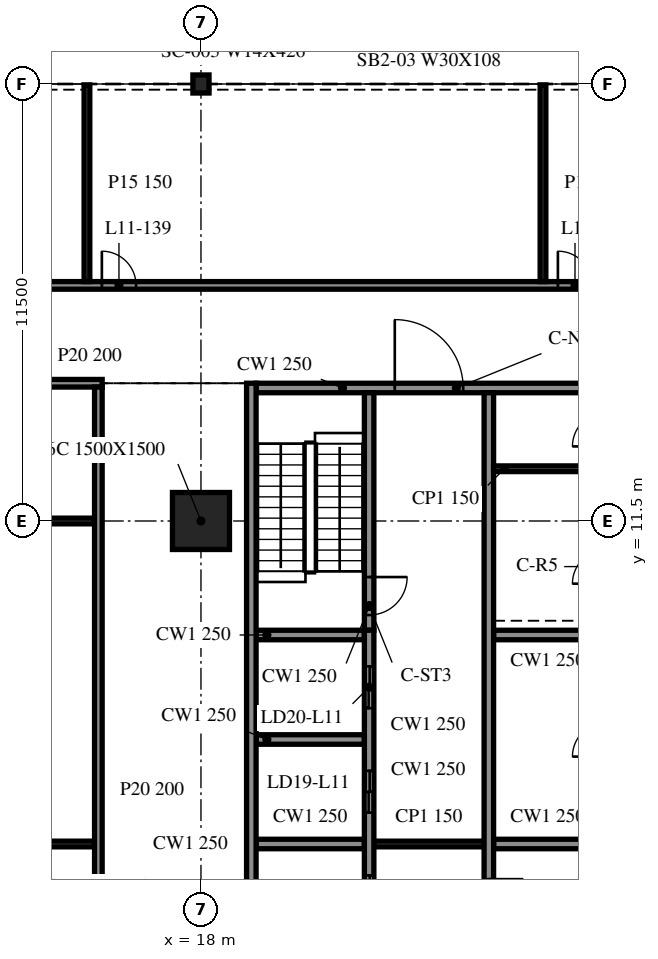
"""IFC4 building model, lengths in metres.
Left out: names, types, materials, properties, quantities, classifications, styles, units other than length and angle.
Written with IfcOpenShell. Run it as: python <this file> out.ifc"""

import sys

from ifc_helpers import new_model, si_unit, direction, frame, frame_2d, origin, origin_2d, place, context, subcontext, project, spatial, rectangle, i_section, extrude, element, fill, save


model = new_model("IFC4")
c1 = context("Model", 3, precision=1e-05, world=origin(), true_north=direction((0.0, 1.0)))
c2 = subcontext(c1, "Body", "Model", "MODEL_VIEW")
j1 = project(units=[si_unit("LENGTHUNIT", "METRE"), si_unit("PLANEANGLEUNIT", "RADIAN")], contexts=[c1])
p1 = place(None, origin())
s1 = spatial("IfcSite", under=j1, at=p1, CompositionType="ELEMENT")
p2 = place(p1, origin())
s2 = spatial("IfcBuilding", under=s1, at=p2, CompositionType="ELEMENT")
p3 = place(p2, frame((0.0, 0.0, 50.3)))
s3 = spatial("IfcBuildingStorey", under=s2, at=p3, CompositionType="ELEMENT", Elevation=50.3)
p4 = place(p3, frame((18.0, 11.5, -0.34), z_axis=(0.0, 0.0, 1.0), x_axis=(1.0, 0.0, 0.0)))
e1 = element("IfcColumn", 1, at=p4, inside=s3, PredefinedType="COLUMN", context=c2, shape_type="SweptSolid", body=[
    extrude(rectangle(XDim=1.5, YDim=1.5, at=origin_2d()), origin(), (0.0, 0.0, 1.0), 4.3),
])
p5 = place(p3, frame((18.0, 23.0, -0.34), z_axis=(0.0, 0.0, 1.0), x_axis=(1.0, 0.0, 0.0)))
e2 = element("IfcColumn", 2, at=p5, inside=s3, PredefinedType="COLUMN", context=c2, shape_type="SweptSolid", body=[
    extrude(i_section(OverallWidth=0.424, OverallDepth=0.475, WebThickness=0.048, FlangeThickness=0.077, at=origin_2d()), origin(), (0.0, 0.0, 1.0), 4.3),
])
p6 = place(p3, frame((19.325, 15.125, 0.0), z_axis=(0.0, 0.0, 1.0), x_axis=(0.0, -1.0, 0.0)))
e3 = element("IfcWall", 3, at=p6, inside=s3, PredefinedType="SOLIDWALL", context=c2, shape_type="SweptSolid", body=[
    extrude(rectangle(XDim=24.25, YDim=0.25, at=frame_2d((12.125, 0.0))), origin(), (0.0, 0.0, 1.0), 3.96),
])
p7 = place(p3, frame((19.45, 15.0, 0.0), z_axis=(0.0, 0.0, 1.0), x_axis=(1.0, 0.0, 0.0)))
e4 = element("IfcWall", 4, at=p7, inside=s3, PredefinedType="SOLIDWALL", context=c2, shape_type="SweptSolid", body=[
    extrude(rectangle(XDim=9.1, YDim=0.25, at=frame_2d((4.55, 0.0))), origin(), (0.0, 0.0, 1.0), 3.96),
])
p8 = place(p7, frame((3.65, 0.0, 0.0)))
e5 = element("IfcOpeningElement", 5, at=p8, cuts=e4, PredefinedType="OPENING", context=c2, shape_type="SweptSolid", body=[
    extrude(rectangle(XDim=1.8, YDim=2.1, at=frame_2d((0.9, 1.05))), frame((0.0, 0.135, 0.0), z_axis=(0.0, -1.0, 0.0), x_axis=(1.0, 0.0, 0.0)), (0.0, 0.0, 1.0), 0.27),
])
p9 = place(p3, frame((22.425, -8.875, 0.0), z_axis=(0.0, 0.0, 1.0), x_axis=(0.0, 1.0, 0.0)))
e6 = element("IfcWall", 6, at=p9, inside=s3, PredefinedType="SOLIDWALL", context=c2, shape_type="SweptSolid", body=[
    extrude(rectangle(XDim=17.5, YDim=0.25, at=frame_2d((8.75, 0.0))), origin(), (0.0, 0.0, 1.0), 3.96),
])
p10 = place(p9, frame((7.2, 0.0, 0.0)))
e7 = element("IfcOpeningElement", 7, at=p10, cuts=e6, PredefinedType="OPENING", context=c2, shape_type="SweptSolid", body=[
    extrude(rectangle(XDim=1.1, YDim=2.1, at=frame_2d((0.55, 1.05))), frame((0.0, 0.135, 0.0), z_axis=(0.0, -1.0, 0.0), x_axis=(1.0, 0.0, 0.0)), (0.0, 0.0, 1.0), 0.27),
])
p11 = place(p9, frame((9.95, 0.0, 0.0)))
e8 = element("IfcOpeningElement", 8, at=p11, cuts=e6, PredefinedType="OPENING", context=c2, shape_type="SweptSolid", body=[
    extrude(rectangle(XDim=1.1, YDim=2.1, at=frame_2d((0.55, 1.05))), frame((0.0, 0.135, 0.0), z_axis=(0.0, -1.0, 0.0), x_axis=(1.0, 0.0, 0.0)), (0.0, 0.0, 1.0), 0.27),
])
p12 = place(p9, frame((12.7, 0.0, 0.0)))
e9 = element("IfcOpeningElement", 9, at=p12, cuts=e6, PredefinedType="OPENING", context=c2, shape_type="SweptSolid", body=[
    extrude(rectangle(XDim=1.1, YDim=2.1, at=frame_2d((0.55, 1.05))), frame((0.0, 0.135, 0.0), z_axis=(0.0, -1.0, 0.0), x_axis=(1.0, 0.0, 0.0)), (0.0, 0.0, 1.0), 0.27),
])
p13 = place(p9, frame((15.45, 0.0, 0.0)))
e10 = element("IfcOpeningElement", 10, at=p13, cuts=e6, PredefinedType="OPENING", context=c2, shape_type="SweptSolid", body=[
    extrude(rectangle(XDim=1.1, YDim=2.1, at=frame_2d((0.55, 1.05))), frame((0.0, 0.135, 0.0), z_axis=(0.0, -1.0, 0.0), x_axis=(1.0, 0.0, 0.0)), (0.0, 0.0, 1.0), 0.27),
])
p14 = place(p9, frame((0.712, 0.0, 0.0)))
e11 = element("IfcOpeningElement", 11, at=p14, cuts=e6, PredefinedType="OPENING", context=c2, shape_type="SweptSolid", body=[
    extrude(rectangle(XDim=0.9, YDim=2.1, at=frame_2d((0.45, 1.05))), frame((0.0, 0.135, 0.0), z_axis=(0.0, -1.0, 0.0), x_axis=(1.0, 0.0, 0.0)), (0.0, 0.0, 1.0), 0.27),
])
p15 = place(p9, frame((3.788, 0.0, 0.0)))
e12 = element("IfcOpeningElement", 12, at=p15, cuts=e6, PredefinedType="OPENING", context=c2, shape_type="SweptSolid", body=[
    extrude(rectangle(XDim=0.9, YDim=2.1, at=frame_2d((0.45, 1.05))), frame((0.0, 0.135, 0.0), z_axis=(0.0, -1.0, 0.0), x_axis=(1.0, 0.0, 0.0)), (0.0, 0.0, 1.0), 0.27),
])
p16 = place(p3, frame((22.425, 14.875, 0.0), z_axis=(0.0, 0.0, 1.0), x_axis=(0.0, -1.0, 0.0)))
e13 = element("IfcWall", 13, at=p16, inside=s3, PredefinedType="SOLIDWALL", context=c2, shape_type="SweptSolid", body=[
    extrude(rectangle(XDim=6.25, YDim=0.25, at=frame_2d((3.125, 0.0))), origin(), (0.0, 0.0, 1.0), 3.96),
])
p17 = place(p16, frame((4.85, 0.0, 0.0)))
e14 = element("IfcOpeningElement", 14, at=p17, cuts=e13, PredefinedType="OPENING", context=c2, shape_type="SweptSolid", body=[
    extrude(rectangle(XDim=1.0, YDim=2.1, at=frame_2d((0.5, 1.05))), frame((0.0, 0.135, 0.0), z_axis=(0.0, -1.0, 0.0), x_axis=(1.0, 0.0, 0.0)), (0.0, 0.0, 1.0), 0.27),
])
p18 = place(p3, frame((25.575, 14.875, 0.0), z_axis=(0.0, 0.0, 1.0), x_axis=(0.0, -1.0, 0.0)))
e15 = element("IfcWall", 15, at=p18, inside=s3, PredefinedType="SOLIDWALL", context=c2, shape_type="SweptSolid", body=[
    extrude(rectangle(XDim=17.5, YDim=0.25, at=frame_2d((8.75, 0.0))), origin(), (0.0, 0.0, 1.0), 3.96),
])
p19 = place(p18, frame((15.45, 0.0, 0.0)))
e16 = element("IfcOpeningElement", 16, at=p19, cuts=e15, PredefinedType="OPENING", context=c2, shape_type="SweptSolid", body=[
    extrude(rectangle(XDim=1.1, YDim=2.1, at=frame_2d((0.55, 1.05))), frame((0.0, 0.135, 0.0), z_axis=(0.0, -1.0, 0.0), x_axis=(1.0, 0.0, 0.0)), (0.0, 0.0, 1.0), 0.27),
])
p20 = place(p18, frame((12.8, 0.0, 0.0)))
e17 = element("IfcOpeningElement", 17, at=p20, cuts=e15, PredefinedType="OPENING", context=c2, shape_type="SweptSolid", body=[
    extrude(rectangle(XDim=0.9, YDim=2.1, at=frame_2d((0.45, 1.05))), frame((0.0, 0.135, 0.0), z_axis=(0.0, -1.0, 0.0), x_axis=(1.0, 0.0, 0.0)), (0.0, 0.0, 1.0), 0.27),
])
for number, where, z_axis, x_axis in (
    (18, (19.45, 3.0, 0.0), (0.0, 0.0, 1.0), (1.0, 0.0, 0.0)),
    (19, (19.45, 5.75, 0.0), (0.0, 0.0, 1.0), (1.0, 0.0, 0.0)),
    (20, (19.45, 8.5, 0.0), (0.0, 0.0, 1.0), (1.0, 0.0, 0.0)),
    (21, (25.7, 3.0, 0.0), (0.0, 0.0, 1.0), (1.0, 0.0, 0.0)),
    (22, (25.7, 8.5, 0.0), (0.0, 0.0, 1.0), (1.0, 0.0, 0.0)),
):
    element("IfcWall", number, at=place(p3, frame(where, z_axis=z_axis, x_axis=x_axis)), inside=s3, PredefinedType="SOLIDWALL", context=c2, shape_type="SweptSolid", body=[
        extrude(rectangle(XDim=2.85, YDim=0.25, at=frame_2d((1.425, 0.0))), origin(), (0.0, 0.0, 1.0), 3.96),
    ])
p21 = place(p3, frame((22.55, 3.0, 0.0), z_axis=(0.0, 0.0, 1.0), x_axis=(1.0, 0.0, 0.0)))
e23 = element("IfcWall", 23, at=p21, inside=s3, PredefinedType="PARTITIONING", context=c2, shape_type="SweptSolid", body=[
    extrude(rectangle(XDim=2.9, YDim=0.15, at=frame_2d((1.45, 0.0))), origin(), (0.0, 0.0, 1.0), 3.96),
])
p22 = place(p3, frame((25.7, 12.875, 0.0), z_axis=(0.0, 0.0, 1.0), x_axis=(1.0, 0.0, 0.0)))
e24 = element("IfcWall", 24, at=p22, inside=s3, PredefinedType="PARTITIONING", context=c2, shape_type="SweptSolid", body=[
    extrude(rectangle(XDim=2.85, YDim=0.15, at=frame_2d((1.425, 0.0))), origin(), (0.0, 0.0, 1.0), 3.96),
])
for number, where, z_axis, x_axis in (
    (25, (8.7, 3.0, 0.0), (0.0, 0.0, 1.0), (1.0, 0.0, 0.0)),
    (26, (8.7, 11.5, 0.0), (0.0, 0.0, 1.0), (1.0, 0.0, 0.0)),
):
    element("IfcWall", number, at=place(p3, frame(where, z_axis=z_axis, x_axis=x_axis)), inside=s3, PredefinedType="PARTITIONING", context=c2, shape_type="SweptSolid", body=[
        extrude(rectangle(XDim=6.5, YDim=0.15, at=frame_2d((3.25, 0.0))), origin(), (0.0, 0.0, 1.0), 3.96),
    ])
p23 = place(p3, frame((8.5, 15.125, 0.0), z_axis=(0.0, 0.0, 1.0), x_axis=(1.0, 0.0, 0.0)))
e27 = element("IfcWall", 27, at=p23, inside=s3, PredefinedType="PARTITIONING", context=c2, shape_type="SweptSolid", body=[
    extrude(rectangle(XDim=6.9, YDim=0.2, at=frame_2d((3.45, 0.0))), origin(), (0.0, 0.0, 1.0), 3.96),
])
p24 = place(p23, frame((2.9, 0.0, 0.0)))
e28 = element("IfcOpeningElement", 28, at=p24, cuts=e27, PredefinedType="OPENING", context=c2, shape_type="SweptSolid", body=[
    extrude(rectangle(XDim=1.0, YDim=2.1, at=frame_2d((0.5, 1.05))), frame((0.0, 0.11, 0.0), z_axis=(0.0, -1.0, 0.0), x_axis=(1.0, 0.0, 0.0)), (0.0, 0.0, 1.0), 0.22),
])
p25 = place(p3, frame((-41.708, 17.7, 0.0), z_axis=(0.0, 0.0, 1.0), x_axis=(1.0, 0.0, 0.0)))
e29 = element("IfcWall", 29, at=p25, inside=s3, PredefinedType="PARTITIONING", context=c2, shape_type="SweptSolid", body=[
    extrude(rectangle(XDim=95.416, YDim=0.2, at=frame_2d((47.708, 0.0))), origin(), (0.0, 0.0, 1.0), 3.96),
])
p26 = place(p25, frame((7.5, 0.0, 0.0)))
e30 = element("IfcOpeningElement", 30, at=p26, cuts=e29, PredefinedType="OPENING", context=c2, shape_type="SweptSolid", body=[
    extrude(rectangle(XDim=0.9, YDim=2.1, at=frame_2d((0.45, 1.05))), frame((0.0, 0.11, 0.0), z_axis=(0.0, -1.0, 0.0), x_axis=(1.0, 0.0, 0.0)), (0.0, 0.0, 1.0), 0.22),
])
p27 = place(p25, frame((13.5, 0.0, 0.0)))
e31 = element("IfcOpeningElement", 31, at=p27, cuts=e29, PredefinedType="OPENING", context=c2, shape_type="SweptSolid", body=[
    extrude(rectangle(XDim=0.9, YDim=2.1, at=frame_2d((0.45, 1.05))), frame((0.0, 0.11, 0.0), z_axis=(0.0, -1.0, 0.0), x_axis=(1.0, 0.0, 0.0)), (0.0, 0.0, 1.0), 0.22),
])
p28 = place(p25, frame((19.5, 0.0, 0.0)))
e32 = element("IfcOpeningElement", 32, at=p28, cuts=e29, PredefinedType="OPENING", context=c2, shape_type="SweptSolid", body=[
    extrude(rectangle(XDim=0.9, YDim=2.1, at=frame_2d((0.45, 1.05))), frame((0.0, 0.11, 0.0), z_axis=(0.0, -1.0, 0.0), x_axis=(1.0, 0.0, 0.0)), (0.0, 0.0, 1.0), 0.22),
])
p29 = place(p25, frame((31.5, 0.0, 0.0)))
e33 = element("IfcOpeningElement", 33, at=p29, cuts=e29, PredefinedType="OPENING", context=c2, shape_type="SweptSolid", body=[
    extrude(rectangle(XDim=0.9, YDim=2.1, at=frame_2d((0.45, 1.05))), frame((0.0, 0.11, 0.0), z_axis=(0.0, -1.0, 0.0), x_axis=(1.0, 0.0, 0.0)), (0.0, 0.0, 1.0), 0.22),
])
p30 = place(p25, frame((34.5, 0.0, 0.0)))
e34 = element("IfcOpeningElement", 34, at=p30, cuts=e29, PredefinedType="OPENING", context=c2, shape_type="SweptSolid", body=[
    extrude(rectangle(XDim=0.9, YDim=2.1, at=frame_2d((0.45, 1.05))), frame((0.0, 0.11, 0.0), z_axis=(0.0, -1.0, 0.0), x_axis=(1.0, 0.0, 0.0)), (0.0, 0.0, 1.0), 0.22),
])
p31 = place(p25, frame((43.5, 0.0, 0.0)))
e35 = element("IfcOpeningElement", 35, at=p31, cuts=e29, PredefinedType="OPENING", context=c2, shape_type="SweptSolid", body=[
    extrude(rectangle(XDim=0.9, YDim=2.1, at=frame_2d((0.45, 1.05))), frame((0.0, 0.11, 0.0), z_axis=(0.0, -1.0, 0.0), x_axis=(1.0, 0.0, 0.0)), (0.0, 0.0, 1.0), 0.22),
])
p32 = place(p25, frame((47.3, 0.0, 0.0)))
e36 = element("IfcOpeningElement", 36, at=p32, cuts=e29, PredefinedType="OPENING", context=c2, shape_type="SweptSolid", body=[
    extrude(rectangle(XDim=0.9, YDim=2.1, at=frame_2d((0.45, 1.05))), frame((0.0, 0.11, 0.0), z_axis=(0.0, -1.0, 0.0), x_axis=(1.0, 0.0, 0.0)), (0.0, 0.0, 1.0), 0.22),
])
p33 = place(p25, frame((51.1, 0.0, 0.0)))
e37 = element("IfcOpeningElement", 37, at=p33, cuts=e29, PredefinedType="OPENING", context=c2, shape_type="SweptSolid", body=[
    extrude(rectangle(XDim=0.9, YDim=2.1, at=frame_2d((0.45, 1.05))), frame((0.0, 0.11, 0.0), z_axis=(0.0, -1.0, 0.0), x_axis=(1.0, 0.0, 0.0)), (0.0, 0.0, 1.0), 0.22),
])
p34 = place(p25, frame((57.1, 0.0, 0.0)))
e38 = element("IfcOpeningElement", 38, at=p34, cuts=e29, PredefinedType="OPENING", context=c2, shape_type="SweptSolid", body=[
    extrude(rectangle(XDim=0.9, YDim=2.1, at=frame_2d((0.45, 1.05))), frame((0.0, 0.11, 0.0), z_axis=(0.0, -1.0, 0.0), x_axis=(1.0, 0.0, 0.0)), (0.0, 0.0, 1.0), 0.22),
])
p35 = place(p25, frame((69.1, 0.0, 0.0)))
e39 = element("IfcOpeningElement", 39, at=p35, cuts=e29, PredefinedType="OPENING", context=c2, shape_type="SweptSolid", body=[
    extrude(rectangle(XDim=0.9, YDim=2.1, at=frame_2d((0.45, 1.05))), frame((0.0, 0.11, 0.0), z_axis=(0.0, -1.0, 0.0), x_axis=(1.0, 0.0, 0.0)), (0.0, 0.0, 1.0), 0.22),
])
p36 = place(p25, frame((72.1, 0.0, 0.0)))
e40 = element("IfcOpeningElement", 40, at=p36, cuts=e29, PredefinedType="OPENING", context=c2, shape_type="SweptSolid", body=[
    extrude(rectangle(XDim=0.9, YDim=2.1, at=frame_2d((0.45, 1.05))), frame((0.0, 0.11, 0.0), z_axis=(0.0, -1.0, 0.0), x_axis=(1.0, 0.0, 0.0)), (0.0, 0.0, 1.0), 0.22),
])
p37 = place(p25, frame((81.1, 0.0, 0.0)))
e41 = element("IfcOpeningElement", 41, at=p37, cuts=e29, PredefinedType="OPENING", context=c2, shape_type="SweptSolid", body=[
    extrude(rectangle(XDim=0.9, YDim=2.1, at=frame_2d((0.45, 1.05))), frame((0.0, 0.11, 0.0), z_axis=(0.0, -1.0, 0.0), x_axis=(1.0, 0.0, 0.0)), (0.0, 0.0, 1.0), 0.22),
])
p38 = place(p25, frame((87.1, 0.0, 0.0)))
e42 = element("IfcOpeningElement", 42, at=p38, cuts=e29, PredefinedType="OPENING", context=c2, shape_type="SweptSolid", body=[
    extrude(rectangle(XDim=0.9, YDim=2.1, at=frame_2d((0.45, 1.05))), frame((0.0, 0.11, 0.0), z_axis=(0.0, -1.0, 0.0), x_axis=(1.0, 0.0, 0.0)), (0.0, 0.0, 1.0), 0.22),
])
p39 = place(p3, frame((15.0, 17.8, 0.0), z_axis=(0.0, 0.0, 1.0), x_axis=(0.0, 1.0, 0.0)))
e43 = element("IfcWall", 43, at=p39, inside=s3, PredefinedType="PARTITIONING", context=c2, shape_type="SweptSolid", body=[
    extrude(rectangle(XDim=5.175, YDim=0.15, at=frame_2d((2.587, 0.0))), origin(), (0.0, 0.0, 1.0), 3.96),
])
p40 = place(p3, frame((15.3, -9.025, 0.0), z_axis=(0.0, 0.0, 1.0), x_axis=(0.0, 1.0, 0.0)))
e44 = element("IfcWall", 44, at=p40, inside=s3, PredefinedType="PARTITIONING", context=c2, shape_type="SweptSolid", body=[
    extrude(rectangle(XDim=24.05, YDim=0.2, at=frame_2d((12.025, 0.0))), origin(), (0.0, 0.0, 1.0), 3.96),
])
p41 = place(p3, frame((27.0, 17.8, 0.0), z_axis=(0.0, 0.0, 1.0), x_axis=(0.0, 1.0, 0.0)))
e45 = element("IfcWall", 45, at=p41, inside=s3, PredefinedType="PARTITIONING", context=c2, shape_type="SweptSolid", body=[
    extrude(rectangle(XDim=5.175, YDim=0.15, at=frame_2d((2.587, 0.0))), origin(), (0.0, 0.0, 1.0), 3.96),
])
p42 = place(p8, origin())
e46 = element("IfcDoor", 46, at=p42, inside=s3, OperationType="DOUBLE_DOOR_SINGLE_SWING", PredefinedType="DOOR", context=c2, shape_type="SweptSolid", body=[
    extrude(rectangle(XDim=1.8, YDim=2.1, at=frame_2d((0.9, 1.05))), frame((0.0, 0.025, 0.0), z_axis=(0.0, -1.0, 0.0), x_axis=(1.0, 0.0, 0.0)), (0.0, 0.0, 1.0), 0.05),
])
fill(e5, e46)
p43 = place(p11, origin())
e47 = element("IfcDoor", 47, at=p43, inside=s3, OperationType="DOUBLE_DOOR_SLIDING", PredefinedType="DOOR", context=c2, shape_type="SweptSolid", body=[
    extrude(rectangle(XDim=1.1, YDim=2.1, at=frame_2d((0.55, 1.05))), frame((0.0, 0.025, 0.0), z_axis=(0.0, -1.0, 0.0), x_axis=(1.0, 0.0, 0.0)), (0.0, 0.0, 1.0), 0.05),
])
fill(e8, e47)
p44 = place(p12, origin())
e48 = element("IfcDoor", 48, at=p44, inside=s3, OperationType="DOUBLE_DOOR_SLIDING", PredefinedType="DOOR", context=c2, shape_type="SweptSolid", body=[
    extrude(rectangle(XDim=1.1, YDim=2.1, at=frame_2d((0.55, 1.05))), frame((0.0, 0.025, 0.0), z_axis=(0.0, -1.0, 0.0), x_axis=(1.0, 0.0, 0.0)), (0.0, 0.0, 1.0), 0.05),
])
fill(e9, e48)
p45 = place(p13, origin())
e49 = element("IfcDoor", 49, at=p45, inside=s3, OperationType="DOUBLE_DOOR_SLIDING", PredefinedType="DOOR", context=c2, shape_type="SweptSolid", body=[
    extrude(rectangle(XDim=1.1, YDim=2.1, at=frame_2d((0.55, 1.05))), frame((0.0, 0.025, 0.0), z_axis=(0.0, -1.0, 0.0), x_axis=(1.0, 0.0, 0.0)), (0.0, 0.0, 1.0), 0.05),
])
fill(e10, e49)
p46 = place(p17, origin())
e50 = element("IfcDoor", 50, at=p46, inside=s3, OperationType="SINGLE_SWING_LEFT", PredefinedType="DOOR", context=c2, shape_type="SweptSolid", body=[
    extrude(rectangle(XDim=1.0, YDim=2.1, at=frame_2d((0.5, 1.05))), frame((0.0, 0.025, 0.0), z_axis=(0.0, -1.0, 0.0), x_axis=(1.0, 0.0, 0.0)), (0.0, 0.0, 1.0), 0.05),
])
fill(e14, e50)
p47 = place(p34, origin())
e51 = element("IfcDoor", 51, at=p47, inside=s3, OperationType="SINGLE_SWING_RIGHT", PredefinedType="DOOR", context=c2, shape_type="SweptSolid", body=[
    extrude(rectangle(XDim=0.9, YDim=2.1, at=frame_2d((0.45, 1.05))), frame((0.0, 0.025, 0.0), z_axis=(0.0, -1.0, 0.0), x_axis=(1.0, 0.0, 0.0)), (0.0, 0.0, 1.0), 0.05),
])
fill(e38, e51)
p48 = place(p35, origin())
e52 = element("IfcDoor", 52, at=p48, inside=s3, OperationType="SINGLE_SWING_RIGHT", PredefinedType="DOOR", context=c2, shape_type="SweptSolid", body=[
    extrude(rectangle(XDim=0.9, YDim=2.1, at=frame_2d((0.45, 1.05))), frame((0.0, 0.025, 0.0), z_axis=(0.0, -1.0, 0.0), x_axis=(1.0, 0.0, 0.0)), (0.0, 0.0, 1.0), 0.05),
])
fill(e39, e52)
save(model, sys.argv[1])
